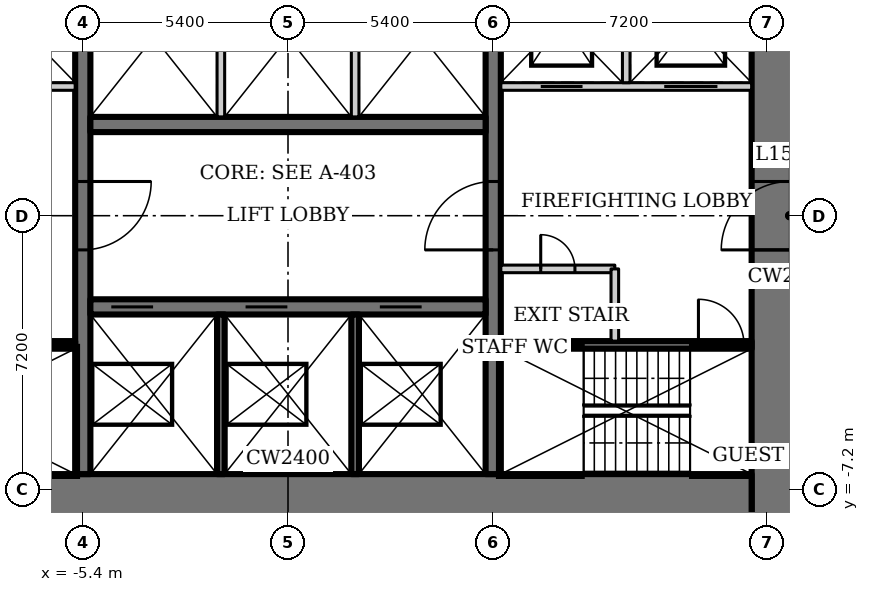
"""IFC4 building model, lengths in metres.
Left out: names, types, materials, properties, quantities, classifications, styles, units other than length and angle.
Written with IfcOpenShell. Run it as: python <this file> out.ifc"""

import sys

from ifc_helpers import new_model, si_unit, direction, frame, frame_2d, origin, place, context, subcontext, project, spatial, rectangle, extrude, element, fill, save


model = new_model("IFC4")
c1 = context("Model", 3, precision=1e-05, world=origin(), true_north=direction((0.0, 1.0)))
c2 = subcontext(c1, "Body", "Model", "MODEL_VIEW")
j1 = project(units=[si_unit("LENGTHUNIT", "METRE"), si_unit("PLANEANGLEUNIT", "RADIAN")], contexts=[c1])
p1 = place(None, origin())
s1 = spatial("IfcSite", under=j1, at=p1, CompositionType="ELEMENT")
p2 = place(p1, origin())
s2 = spatial("IfcBuilding", under=s1, at=p2, CompositionType="ELEMENT")
p3 = place(p2, frame((0.0, 0.0, 69.4)))
s3 = spatial("IfcBuildingStorey", under=s2, at=p3, CompositionType="ELEMENT", Elevation=69.4)
p4 = place(p3, frame((13.2, -13.0, 0.0), z_axis=(0.0, 0.0, 1.0), x_axis=(0.0, 1.0, 0.0)))
e1 = element("IfcWall", 1, at=p4, inside=s3, PredefinedType="SHEAR", context=c2, shape_type="SweptSolid", body=[
    extrude(rectangle(XDim=26.0, YDim=2.0, at=frame_2d((13.0, 0.0))), origin(), (0.0, 0.0, 1.0), 3.6),
])
p5 = place(p4, frame((12.1, 0.0, 0.0)))
e2 = element("IfcOpeningElement", 2, at=p5, cuts=e1, PredefinedType="OPENING", context=c2, shape_type="SweptSolid", body=[
    extrude(rectangle(XDim=1.8, YDim=2.1, at=frame_2d((0.9, 1.05))), frame((0.0, 1.01, 0.0), z_axis=(0.0, -1.0, 0.0), x_axis=(1.0, 0.0, 0.0)), (0.0, 0.0, 1.0), 2.02),
])
p6 = place(p3, frame((-12.2, -8.0, 0.0), z_axis=(0.0, 0.0, 1.0), x_axis=(1.0, 0.0, 0.0)))
e3 = element("IfcWall", 3, at=p6, inside=s3, PredefinedType="SHEAR", context=c2, shape_type="SweptSolid", body=[
    extrude(rectangle(XDim=24.4, YDim=2.4, at=frame_2d((12.2, 0.0))), origin(), (0.0, 0.0, 1.0), 3.6),
])
p7 = place(p3, frame((5.4, -6.8, 0.0), z_axis=(0.0, 0.0, 1.0), x_axis=(0.0, 1.0, 0.0)))
e4 = element("IfcWall", 4, at=p7, inside=s3, PredefinedType="SHEAR", context=c2, shape_type="SweptSolid", body=[
    extrude(rectangle(XDim=13.6, YDim=0.4, at=frame_2d((6.8, 0.0))), origin(), (0.0, 0.0, 1.0), 3.6),
])
p8 = place(p7, frame((5.9, 0.0, 0.0)))
e5 = element("IfcOpeningElement", 5, at=p8, cuts=e4, PredefinedType="OPENING", context=c2, shape_type="SweptSolid", body=[
    extrude(rectangle(XDim=1.8, YDim=2.1, at=frame_2d((0.9, 1.05))), frame((0.0, 0.21, 0.0), z_axis=(0.0, -1.0, 0.0), x_axis=(1.0, 0.0, 0.0)), (0.0, 0.0, 1.0), 0.42),
])
p9 = place(p3, frame((-5.4, 6.8, 0.0), z_axis=(0.0, 0.0, 1.0), x_axis=(0.0, -1.0, 0.0)))
e6 = element("IfcWall", 6, at=p9, inside=s3, PredefinedType="SHEAR", context=c2, shape_type="SweptSolid", body=[
    extrude(rectangle(XDim=13.6, YDim=0.4, at=frame_2d((6.8, 0.0))), origin(), (0.0, 0.0, 1.0), 3.6),
])
p10 = place(p9, frame((5.9, 0.0, 0.0)))
e7 = element("IfcOpeningElement", 7, at=p10, cuts=e6, PredefinedType="OPENING", context=c2, shape_type="SweptSolid", body=[
    extrude(rectangle(XDim=1.8, YDim=2.1, at=frame_2d((0.9, 1.05))), frame((0.0, 0.21, 0.0), z_axis=(0.0, -1.0, 0.0), x_axis=(1.0, 0.0, 0.0)), (0.0, 0.0, 1.0), 0.42),
])
p11 = place(p3, frame((-5.2, -2.4, 0.0), z_axis=(0.0, 0.0, 1.0), x_axis=(1.0, 0.0, 0.0)))
e8 = element("IfcWall", 8, at=p11, inside=s3, PredefinedType="SHEAR", context=c2, shape_type="SweptSolid", body=[
    extrude(rectangle(XDim=10.4, YDim=0.4, at=frame_2d((5.2, 0.0))), origin(), (0.0, 0.0, 1.0), 3.6),
])
p12 = place(p11, frame((0.55, 0.0, 0.0)))
e9 = element("IfcOpeningElement", 9, at=p12, cuts=e8, PredefinedType="OPENING", context=c2, shape_type="SweptSolid", body=[
    extrude(rectangle(XDim=1.1, YDim=2.2, at=frame_2d((0.55, 1.1))), frame((0.0, 0.21, 0.0), z_axis=(0.0, -1.0, 0.0), x_axis=(1.0, 0.0, 0.0)), (0.0, 0.0, 1.0), 0.42),
])
p13 = place(p11, frame((4.083, 0.0, 0.0)))
e10 = element("IfcOpeningElement", 10, at=p13, cuts=e8, PredefinedType="OPENING", context=c2, shape_type="SweptSolid", body=[
    extrude(rectangle(XDim=1.1, YDim=2.2, at=frame_2d((0.55, 1.1))), frame((0.0, 0.21, 0.0), z_axis=(0.0, -1.0, 0.0), x_axis=(1.0, 0.0, 0.0)), (0.0, 0.0, 1.0), 0.42),
])
p14 = place(p11, frame((7.617, 0.0, 0.0)))
e11 = element("IfcOpeningElement", 11, at=p14, cuts=e8, PredefinedType="OPENING", context=c2, shape_type="SweptSolid", body=[
    extrude(rectangle(XDim=1.1, YDim=2.2, at=frame_2d((0.55, 1.1))), frame((0.0, 0.21, 0.0), z_axis=(0.0, -1.0, 0.0), x_axis=(1.0, 0.0, 0.0)), (0.0, 0.0, 1.0), 0.42),
])
for number, where, z_axis, x_axis in (
    (12, (-1.767, -2.6, 0.0), (0.0, 0.0, 1.0), (0.0, -1.0, 0.0)),
    (13, (1.767, -2.6, 0.0), (0.0, 0.0, 1.0), (0.0, -1.0, 0.0)),
):
    element("IfcWall", number, at=place(p3, frame(where, z_axis=z_axis, x_axis=x_axis)), inside=s3, PredefinedType="SOLIDWALL", context=c2, shape_type="SweptSolid", body=[
        extrude(rectangle(XDim=4.2, YDim=0.2, at=frame_2d((2.1, 0.0))), origin(), (0.0, 0.0, 1.0), 3.6),
    ])
p15 = place(p3, frame((5.2, 2.4, 0.0), z_axis=(0.0, 0.0, 1.0), x_axis=(-1.0, 0.0, 0.0)))
e14 = element("IfcWall", 14, at=p15, inside=s3, PredefinedType="SHEAR", context=c2, shape_type="SweptSolid", body=[
    extrude(rectangle(XDim=10.4, YDim=0.4, at=frame_2d((5.2, 0.0))), origin(), (0.0, 0.0, 1.0), 3.6),
])
for number, where, z_axis, x_axis in (
    (15, (-1.767, 2.6, 0.0), (0.0, 0.0, 1.0), (0.0, 1.0, 0.0)),
    (16, (1.767, 2.6, 0.0), (0.0, 0.0, 1.0), (0.0, 1.0, 0.0)),
):
    element("IfcWall", number, at=place(p3, frame(where, z_axis=z_axis, x_axis=x_axis)), inside=s3, PredefinedType="SOLIDWALL", context=c2, shape_type="SweptSolid", body=[
        extrude(rectangle(XDim=4.2, YDim=0.2, at=frame_2d((2.1, 0.0))), origin(), (0.0, 0.0, 1.0), 3.6),
    ])
p16 = place(p3, frame((5.6, -3.4, 0.0), z_axis=(0.0, 0.0, 1.0), x_axis=(1.0, 0.0, 0.0)))
e17 = element("IfcWall", 17, at=p16, inside=s3, PredefinedType="SHEAR", context=c2, shape_type="SweptSolid", body=[
    extrude(rectangle(XDim=6.6, YDim=0.2, at=frame_2d((3.3, 0.0))), origin(), (0.0, 0.0, 1.0), 3.6),
])
p17 = place(p16, frame((5.2, 0.0, 0.0)))
e18 = element("IfcOpeningElement", 18, at=p17, cuts=e17, PredefinedType="OPENING", context=c2, shape_type="SweptSolid", body=[
    extrude(rectangle(XDim=1.2, YDim=2.1, at=frame_2d((0.6, 1.05))), frame((0.0, 0.11, 0.0), z_axis=(0.0, -1.0, 0.0), x_axis=(1.0, 0.0, 0.0)), (0.0, 0.0, 1.0), 0.22),
])
p18 = place(p3, frame((12.2, 3.4, 0.0), z_axis=(0.0, 0.0, 1.0), x_axis=(-1.0, 0.0, 0.0)))
e19 = element("IfcWall", 19, at=p18, inside=s3, PredefinedType="SOLIDWALL", context=c2, shape_type="SweptSolid", body=[
    extrude(rectangle(XDim=6.6, YDim=0.2, at=frame_2d((3.3, 0.0))), origin(), (0.0, 0.0, 1.0), 3.6),
])
p19 = place(p18, frame((4.45, 0.0, 0.0)))
e20 = element("IfcOpeningElement", 20, at=p19, cuts=e19, PredefinedType="OPENING", context=c2, shape_type="SweptSolid", body=[
    extrude(rectangle(XDim=1.1, YDim=2.2, at=frame_2d((0.55, 1.1))), frame((0.0, 0.11, 0.0), z_axis=(0.0, -1.0, 0.0), x_axis=(1.0, 0.0, 0.0)), (0.0, 0.0, 1.0), 0.22),
])
p20 = place(p18, frame((0.9, 0.0, 0.0)))
e21 = element("IfcOpeningElement", 21, at=p20, cuts=e19, PredefinedType="OPENING", context=c2, shape_type="SweptSolid", body=[
    extrude(rectangle(XDim=1.4, YDim=2.2, at=frame_2d((0.7, 1.1))), frame((0.0, 0.11, 0.0), z_axis=(0.0, -1.0, 0.0), x_axis=(1.0, 0.0, 0.0)), (0.0, 0.0, 1.0), 0.22),
])
p21 = place(p3, frame((8.9, 3.5, 0.0), z_axis=(0.0, 0.0, 1.0), x_axis=(0.0, 1.0, 0.0)))
e22 = element("IfcWall", 22, at=p21, inside=s3, PredefinedType="SOLIDWALL", context=c2, shape_type="SweptSolid", body=[
    extrude(rectangle(XDim=3.3, YDim=0.2, at=frame_2d((1.65, 0.0))), origin(), (0.0, 0.0, 1.0), 3.6),
])
p22 = place(p3, frame((-5.6, -3.4, 0.0), z_axis=(0.0, 0.0, 1.0), x_axis=(-1.0, 0.0, 0.0)))
e23 = element("IfcWall", 23, at=p22, inside=s3, PredefinedType="SHEAR", context=c2, shape_type="SweptSolid", body=[
    extrude(rectangle(XDim=6.6, YDim=0.2, at=frame_2d((3.3, 0.0))), origin(), (0.0, 0.0, 1.0), 3.6),
])
p23 = place(p22, frame((5.2, 0.0, 0.0)))
e24 = element("IfcOpeningElement", 24, at=p23, cuts=e23, PredefinedType="OPENING", context=c2, shape_type="SweptSolid", body=[
    extrude(rectangle(XDim=1.2, YDim=2.1, at=frame_2d((0.6, 1.05))), frame((0.0, 0.11, 0.0), z_axis=(0.0, -1.0, 0.0), x_axis=(1.0, 0.0, 0.0)), (0.0, 0.0, 1.0), 0.22),
])
p24 = place(p3, frame((-12.2, 3.4, 0.0), z_axis=(0.0, 0.0, 1.0), x_axis=(1.0, 0.0, 0.0)))
e25 = element("IfcWall", 25, at=p24, inside=s3, PredefinedType="SOLIDWALL", context=c2, shape_type="SweptSolid", body=[
    extrude(rectangle(XDim=6.6, YDim=0.2, at=frame_2d((3.3, 0.0))), origin(), (0.0, 0.0, 1.0), 3.6),
])
p25 = place(p24, frame((1.05, 0.0, 0.0)))
e26 = element("IfcOpeningElement", 26, at=p25, cuts=e25, PredefinedType="OPENING", context=c2, shape_type="SweptSolid", body=[
    extrude(rectangle(XDim=1.1, YDim=2.2, at=frame_2d((0.55, 1.1))), frame((0.0, 0.11, 0.0), z_axis=(0.0, -1.0, 0.0), x_axis=(1.0, 0.0, 0.0)), (0.0, 0.0, 1.0), 0.22),
])
p26 = place(p24, frame((4.3, 0.0, 0.0)))
e27 = element("IfcOpeningElement", 27, at=p26, cuts=e25, PredefinedType="OPENING", context=c2, shape_type="SweptSolid", body=[
    extrude(rectangle(XDim=1.4, YDim=2.2, at=frame_2d((0.7, 1.1))), frame((0.0, 0.11, 0.0), z_axis=(0.0, -1.0, 0.0), x_axis=(1.0, 0.0, 0.0)), (0.0, 0.0, 1.0), 0.22),
])
p27 = place(p3, frame((5.6, -1.4, 0.0), z_axis=(0.0, 0.0, 1.0), x_axis=(1.0, 0.0, 0.0)))
e28 = element("IfcWall", 28, at=p27, inside=s3, PredefinedType="SOLIDWALL", context=c2, shape_type="SweptSolid", body=[
    extrude(rectangle(XDim=3.0, YDim=0.2, at=frame_2d((1.5, 0.0))), origin(), (0.0, 0.0, 1.0), 3.45),
])
p28 = place(p27, frame((1.05, 0.0, 0.0)))
e29 = element("IfcOpeningElement", 29, at=p28, cuts=e28, PredefinedType="OPENING", context=c2, shape_type="SweptSolid", body=[
    extrude(rectangle(XDim=0.9, YDim=2.1, at=frame_2d((0.45, 1.05))), frame((0.0, 0.11, 0.0), z_axis=(0.0, -1.0, 0.0), x_axis=(1.0, 0.0, 0.0)), (0.0, 0.0, 1.0), 0.22),
])
p29 = place(p3, frame((8.6, -1.4, 0.0), z_axis=(0.0, 0.0, 1.0), x_axis=(0.0, -1.0, 0.0)))
e30 = element("IfcWall", 30, at=p29, inside=s3, PredefinedType="SOLIDWALL", context=c2, shape_type="SweptSolid", body=[
    extrude(rectangle(XDim=1.9, YDim=0.2, at=frame_2d((0.95, 0.0))), origin(), (0.0, 0.0, 1.0), 3.45),
])
p30 = place(p28, origin())
e31 = element("IfcDoor", 31, at=p30, inside=s3, OperationType="SINGLE_SWING_LEFT", PredefinedType="DOOR", context=c2, shape_type="SweptSolid", body=[
    extrude(rectangle(XDim=0.9, YDim=2.1, at=frame_2d((0.45, 1.05))), frame((0.0, 0.025, 0.0), z_axis=(0.0, -1.0, 0.0), x_axis=(1.0, 0.0, 0.0)), (0.0, 0.0, 1.0), 0.05),
])
fill(e29, e31)
p31 = place(p8, origin())
e32 = element("IfcDoor", 32, at=p31, inside=s3, OperationType="DOUBLE_DOOR_DOUBLE_SWING", PredefinedType="DOOR", context=c2, shape_type="SweptSolid", body=[
    extrude(rectangle(XDim=1.8, YDim=2.1, at=frame_2d((0.9, 1.05))), frame((0.0, 0.025, 0.0), z_axis=(0.0, -1.0, 0.0), x_axis=(1.0, 0.0, 0.0)), (0.0, 0.0, 1.0), 0.05),
])
fill(e5, e32)
p32 = place(p10, origin())
e33 = element("IfcDoor", 33, at=p32, inside=s3, OperationType="DOUBLE_DOOR_DOUBLE_SWING", PredefinedType="DOOR", context=c2, shape_type="SweptSolid", body=[
    extrude(rectangle(XDim=1.8, YDim=2.1, at=frame_2d((0.9, 1.05))), frame((0.0, 0.025, 0.0), z_axis=(0.0, -1.0, 0.0), x_axis=(1.0, 0.0, 0.0)), (0.0, 0.0, 1.0), 0.05),
])
fill(e7, e33)
p33 = place(p17, origin())
e34 = element("IfcDoor", 34, at=p33, inside=s3, OperationType="SINGLE_SWING_RIGHT", PredefinedType="DOOR", context=c2, shape_type="SweptSolid", body=[
    extrude(rectangle(XDim=1.2, YDim=2.1, at=frame_2d((0.6, 1.05))), frame((0.0, 0.025, 0.0), z_axis=(0.0, -1.0, 0.0), x_axis=(1.0, 0.0, 0.0)), (0.0, 0.0, 1.0), 0.05),
])
fill(e18, e34)
p34 = place(p5, origin())
e35 = element("IfcDoor", 35, at=p34, inside=s3, OperationType="DOUBLE_DOOR_DOUBLE_SWING", PredefinedType="DOOR", context=c2, shape_type="SweptSolid", body=[
    extrude(rectangle(XDim=1.8, YDim=2.1, at=frame_2d((0.9, 1.05))), frame((0.0, 0.025, 0.0), z_axis=(0.0, -1.0, 0.0), x_axis=(1.0, 0.0, 0.0)), (0.0, 0.0, 1.0), 0.05),
])
fill(e2, e35)
p35 = place(p12, origin())
e36 = element("IfcDoor", 36, at=p35, inside=s3, OperationType="DOUBLE_DOOR_SLIDING", PredefinedType="DOOR", context=c2, shape_type="SweptSolid", body=[
    extrude(rectangle(XDim=1.1, YDim=2.2, at=frame_2d((0.55, 1.1))), frame((0.0, 0.025, 0.0), z_axis=(0.0, -1.0, 0.0), x_axis=(1.0, 0.0, 0.0)), (0.0, 0.0, 1.0), 0.05),
])
fill(e9, e36)
p36 = place(p13, origin())
e37 = element("IfcDoor", 37, at=p36, inside=s3, OperationType="DOUBLE_DOOR_SLIDING", PredefinedType="DOOR", context=c2, shape_type="SweptSolid", body=[
    extrude(rectangle(XDim=1.1, YDim=2.2, at=frame_2d((0.55, 1.1))), frame((0.0, 0.025, 0.0), z_axis=(0.0, -1.0, 0.0), x_axis=(1.0, 0.0, 0.0)), (0.0, 0.0, 1.0), 0.05),
])
fill(e10, e37)
p37 = place(p14, origin())
e38 = element("IfcDoor", 38, at=p37, inside=s3, OperationType="DOUBLE_DOOR_SLIDING", PredefinedType="DOOR", context=c2, shape_type="SweptSolid", body=[
    extrude(rectangle(XDim=1.1, YDim=2.2, at=frame_2d((0.55, 1.1))), frame((0.0, 0.025, 0.0), z_axis=(0.0, -1.0, 0.0), x_axis=(1.0, 0.0, 0.0)), (0.0, 0.0, 1.0), 0.05),
])
fill(e11, e38)
p38 = place(p19, origin())
e39 = element("IfcDoor", 39, at=p38, inside=s3, OperationType="DOUBLE_DOOR_SLIDING", PredefinedType="DOOR", context=c2, shape_type="SweptSolid", body=[
    extrude(rectangle(XDim=1.1, YDim=2.2, at=frame_2d((0.55, 1.1))), frame((0.0, 0.025, 0.0), z_axis=(0.0, -1.0, 0.0), x_axis=(1.0, 0.0, 0.0)), (0.0, 0.0, 1.0), 0.05),
])
fill(e20, e39)
p39 = place(p20, origin())
e40 = element("IfcDoor", 40, at=p39, inside=s3, OperationType="DOUBLE_DOOR_SLIDING", PredefinedType="DOOR", context=c2, shape_type="SweptSolid", body=[
    extrude(rectangle(XDim=1.4, YDim=2.2, at=frame_2d((0.7, 1.1))), frame((0.0, 0.025, 0.0), z_axis=(0.0, -1.0, 0.0), x_axis=(1.0, 0.0, 0.0)), (0.0, 0.0, 1.0), 0.05),
])
fill(e21, e40)
save(model, sys.argv[1])
